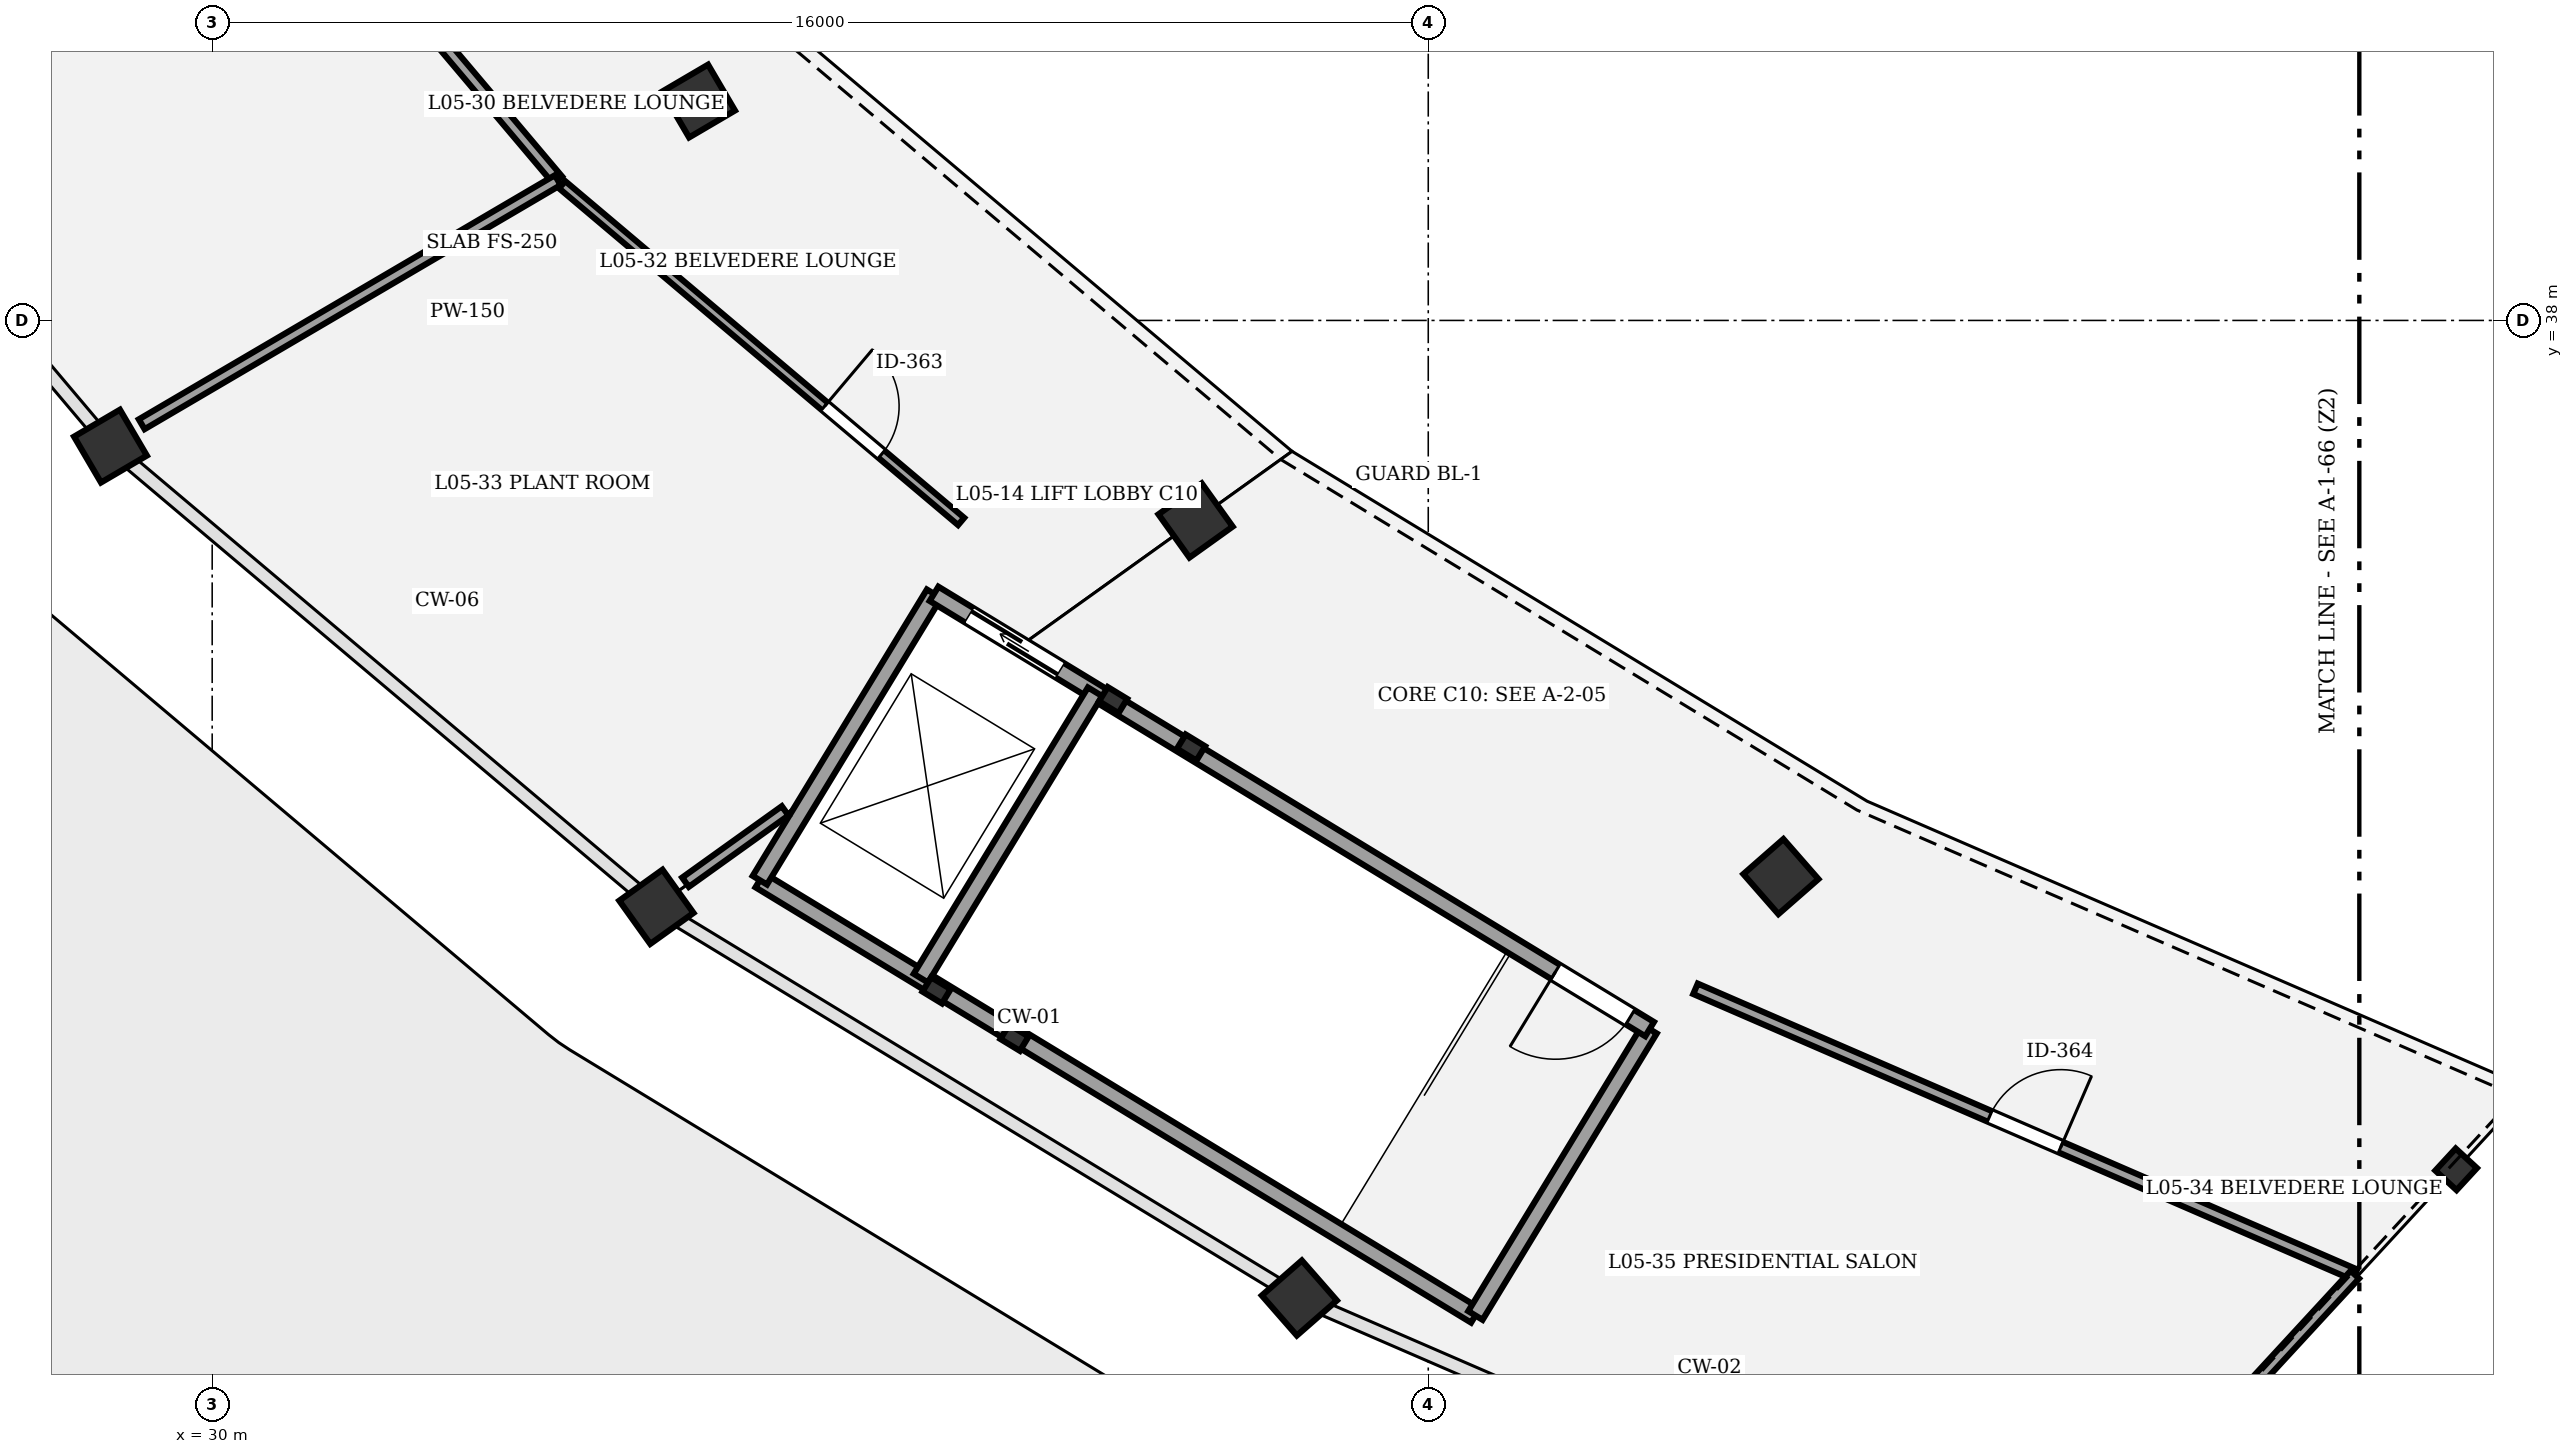
"""IFC4 building model, lengths in metres.
Left out: names, types, materials, properties, quantities, classifications, styles, units other than length and angle.
Written with IfcOpenShell. Run it as: python <this file> out.ifc"""

import sys

from ifc_helpers import new_model, si_unit, direction, frame, frame_2d, origin, origin_2d, place, context, subcontext, project, spatial, rectangle, i_section, extrude, element, fill, save


model = new_model("IFC4")
c1 = context("Model", 3, precision=1e-05, world=origin(), true_north=direction((0.0, 1.0)))
c2 = subcontext(c1, "Body", "Model", "MODEL_VIEW")
j1 = project(units=[si_unit("LENGTHUNIT", "METRE"), si_unit("PLANEANGLEUNIT", "RADIAN")], contexts=[c1])
p1 = place(None, origin())
s1 = spatial("IfcSite", under=j1, at=p1, CompositionType="ELEMENT")
p2 = place(p1, origin())
s2 = spatial("IfcBuilding", under=s1, at=p2, CompositionType="ELEMENT")
p3 = place(p2, frame((0.0, 0.0, 24.0)))
s3 = spatial("IfcBuildingStorey", under=s2, at=p3, CompositionType="ELEMENT", Elevation=24.0)
for number, where, z_axis, x_axis in (
    (1, (36.4, 40.886, 0.0), (0.0, 0.0, 1.0), (-0.863, -0.506, 0.0)),
    (2, (28.662, 36.346, 0.0), (0.0, 0.0, 1.0), (-0.863, -0.506, 0.0)),
    (3, (42.939, 35.368, 0.0), (0.0, 0.0, 1.0), (-0.813, -0.582, 0.0)),
    (4, (35.844, 30.285, 0.0), (0.0, 0.0, 1.0), (-0.813, -0.582, 0.0)),
    (5, (50.64, 30.683, 0.0), (0.0, 0.0, 1.0), (-0.753, -0.659, 0.0)),
    (6, (44.304, 25.139, 0.0), (0.0, 0.0, 1.0), (-0.753, -0.659, 0.0)),
):
    element("IfcColumn", number, at=place(p3, frame(where, z_axis=z_axis, x_axis=x_axis)), inside=s3, PredefinedType="COLUMN", context=c2, shape_type="SweptSolid", body=[
        extrude(rectangle(XDim=0.7, YDim=0.7, at=origin_2d()), origin(), (0.0, 0.0, 1.0), 4.8),
    ])
p4 = place(p3, frame((59.524, 26.832, 0.0), z_axis=(0.0, 0.0, 1.0), x_axis=(-0.677903094969, -0.735151272753, 0.0)))
e7 = element("IfcColumn", 7, at=p4, inside=s3, PredefinedType="COLUMN", context=c2, shape_type="SweptSolid", body=[
    extrude(i_section(OverallWidth=0.395, OverallDepth=0.38, WebThickness=0.017, FlangeThickness=0.026, at=origin_2d()), origin(), (0.0, 0.0, 1.0), 4.8),
])
for number, where, z_axis, x_axis in (
    (8, (42.879, 32.382, 0.0), (0.0, 0.0, 1.0), (-0.854, 0.52, 0.0)),
    (9, (41.854, 33.005, 0.0), (0.0, 0.0, 1.0), (-0.854, 0.52, 0.0)),
    (10, (39.531, 29.186, 0.0), (0.0, 0.0, 1.0), (-0.854, 0.52, 0.0)),
    (11, (40.556, 28.562, 0.0), (0.0, 0.0, 1.0), (-0.854, 0.52, 0.0)),
):
    element("IfcColumn", number, at=place(p3, frame(where, z_axis=z_axis, x_axis=x_axis)), inside=s3, PredefinedType="COLUMN", context=c2, shape_type="SweptSolid", body=[
        extrude(rectangle(XDim=0.3, YDim=0.22, at=origin_2d()), origin(), (0.0, 0.0, 1.0), 4.8),
    ])
p5 = place(p3, frame((46.621, 24.909, 0.0), z_axis=(0.0, 0.0, 1.0), x_axis=(-0.854373055797, 0.519660159651, 0.0)))
e12 = element("IfcWall", 12, at=p5, inside=s3, PredefinedType="SHEAR", context=c2, shape_type="SweptSolid", body=[
    extrude(rectangle(XDim=11.02, YDim=0.22, at=frame_2d((5.51, 0.0))), origin(), (0.0, 0.0, 1.0), 4.55),
])
p6 = place(p3, frame((48.913, 28.677, 0.0), z_axis=(0.0, 0.0, 1.0), x_axis=(-0.519729151243, -0.854331088834, 0.0)))
e13 = element("IfcWall", 13, at=p6, inside=s3, PredefinedType="SHEAR", context=c2, shape_type="SweptSolid", body=[
    extrude(rectangle(XDim=4.41, YDim=0.22, at=frame_2d((2.205, 0.0))), origin(), (0.0, 0.0, 1.0), 4.55),
])
p7 = place(p3, frame((39.497, 34.403, 0.0), z_axis=(0.0, 0.0, 1.0), x_axis=(-0.519664162523, -0.854370621095, 0.0)))
e14 = element("IfcWall", 14, at=p7, inside=s3, PredefinedType="SHEAR", context=c2, shape_type="SweptSolid", body=[
    extrude(rectangle(XDim=4.41, YDim=0.22, at=frame_2d((2.205, 0.0))), origin(), (0.0, 0.0, 1.0), 4.55),
])
p8 = place(p3, frame((48.913, 28.677, 0.0), z_axis=(0.0, 0.0, 1.0), x_axis=(-0.854369202373, 0.51966649501, 0.0)))
e15 = element("IfcWall", 15, at=p8, inside=s3, PredefinedType="SHEAR", context=c2, shape_type="SweptSolid", body=[
    extrude(rectangle(XDim=11.02, YDim=0.22, at=frame_2d((5.51, 0.0))), origin(), (0.0, 0.0, 1.0), 4.55),
])
p9 = place(p8, frame((0.3, 0.0, 0.0)))
e16 = element("IfcOpeningElement", 16, at=p9, cuts=e15, PredefinedType="OPENING", context=c2, shape_type="SweptSolid", body=[
    extrude(rectangle(XDim=1.15, YDim=2.15, at=frame_2d((0.575, 1.075))), frame((0.0, 0.12, 0.0), z_axis=(0.0, -1.0, 0.0), x_axis=(1.0, 0.0, 0.0)), (0.0, 0.0, 1.0), 0.24),
])
p10 = place(p8, frame((9.08, 0.0, 0.0)))
e17 = element("IfcOpeningElement", 17, at=p10, cuts=e15, PredefinedType="OPENING", context=c2, shape_type="SweptSolid", body=[
    extrude(rectangle(XDim=1.4, YDim=2.25, at=frame_2d((0.7, 1.125))), frame((0.0, 0.12, 0.0), z_axis=(0.0, -1.0, 0.0), x_axis=(1.0, 0.0, 0.0)), (0.0, 0.0, 1.0), 0.24),
])
p11 = place(p3, frame((41.616, 33.115, 0.0), z_axis=(0.0, 0.0, 1.0), x_axis=(-0.519664162523, -0.854370621095, 0.0)))
e18 = element("IfcWall", 18, at=p11, inside=s3, PredefinedType="SHEAR", context=c2, shape_type="SweptSolid", body=[
    extrude(rectangle(XDim=4.41, YDim=0.22, at=frame_2d((2.205, 0.0))), origin(), (0.0, 0.0, 1.0), 4.55),
])
p12 = place(p3, frame((29.099, 46.296, 0.0), z_axis=(0.0, 0.0, 1.0), x_axis=(0.645165438128, -0.764042902883, 0.0)))
e19 = element("IfcWall", 19, at=p12, inside=s3, PredefinedType="PARTITIONING", context=c2, shape_type="SweptSolid", body=[
    extrude(rectangle(XDim=8.443, YDim=0.15, at=frame_2d((4.221, 0.0))), origin(), (0.0, 0.0, 1.0), 3.55),
])
p13 = place(p12, frame((3.751, 0.0, 0.0)))
e20 = element("IfcOpeningElement", 20, at=p13, cuts=e19, PredefinedType="OPENING", context=c2, shape_type="SweptSolid", body=[
    extrude(rectangle(XDim=0.94, YDim=2.1, at=frame_2d((0.47, 1.05))), frame((0.0, 0.085, 0.0), z_axis=(0.0, -1.0, 0.0), x_axis=(1.0, 0.0, 0.0)), (0.0, 0.0, 1.0), 0.17),
])
p14 = place(p3, frame((34.604, 39.786, 0.0), z_axis=(0.0, 0.0, 1.0), x_axis=(0.764250978745, -0.644918941796, 0.0)))
e21 = element("IfcWall", 21, at=p14, inside=s3, PredefinedType="PARTITIONING", context=c2, shape_type="SweptSolid", body=[
    extrude(rectangle(XDim=6.87, YDim=0.125, at=frame_2d((3.435, 0.0))), origin(), (0.0, 0.0, 1.0), 3.55),
])
p15 = place(p14, frame((4.52, 0.0, 0.0)))
e22 = element("IfcOpeningElement", 22, at=p15, cuts=e21, PredefinedType="OPENING", context=c2, shape_type="SweptSolid", body=[
    extrude(rectangle(XDim=0.98, YDim=2.1, at=frame_2d((0.49, 1.05))), frame((0.0, 0.073, 0.0), z_axis=(0.0, -1.0, 0.0), x_axis=(1.0, 0.0, 0.0)), (0.0, 0.0, 1.0), 0.145),
])
p16 = place(p3, frame((49.516, 29.207, 0.0), z_axis=(0.0, 0.0, 1.0), x_axis=(0.917503809005, -0.397726992371, 0.0)))
e23 = element("IfcWall", 23, at=p16, inside=s3, PredefinedType="PARTITIONING", context=c2, shape_type="SweptSolid", body=[
    extrude(rectangle(XDim=9.456, YDim=0.15, at=frame_2d((4.728, 0.0))), origin(), (0.0, 0.0, 1.0), 3.55),
])
p17 = place(p16, frame((4.218, 0.0, 0.0)))
e24 = element("IfcOpeningElement", 24, at=p17, cuts=e23, PredefinedType="OPENING", context=c2, shape_type="SweptSolid", body=[
    extrude(rectangle(XDim=1.02, YDim=2.1, at=frame_2d((0.51, 1.05))), frame((0.0, 0.085, 0.0), z_axis=(0.0, -1.0, 0.0), x_axis=(1.0, 0.0, 0.0)), (0.0, 0.0, 1.0), 0.17),
])
p18 = place(p3, frame((34.546, 39.845, 0.0), z_axis=(0.0, 0.0, 1.0), x_axis=(-0.862509234247, -0.506041323251, 0.0)))
e25 = element("IfcWall", 25, at=p18, inside=s3, PredefinedType="PARTITIONING", context=c2, shape_type="SweptSolid", body=[
    extrude(rectangle(XDim=6.346, YDim=0.15, at=frame_2d((3.173, 0.0))), origin(), (0.0, 0.0, 1.0), 3.55),
])
p19 = place(p3, frame((37.538, 31.548, 0.0), z_axis=(0.0, 0.0, 1.0), x_axis=(-0.812873277571, -0.582440584618, 0.0)))
e26 = element("IfcWall", 26, at=p19, inside=s3, PredefinedType="PARTITIONING", context=c2, shape_type="SweptSolid", body=[
    extrude(rectangle(XDim=1.613, YDim=0.15, at=frame_2d((0.806, 0.0))), origin(), (0.0, 0.0, 1.0), 3.55),
])
p20 = place(p3, frame((58.191, 25.446, 0.0), z_axis=(0.0, 0.0, 1.0), x_axis=(-0.677864295951, -0.735187048495, 0.0)))
e27 = element("IfcWall", 27, at=p20, inside=s3, PredefinedType="PARTITIONING", context=c2, shape_type="SweptSolid", body=[
    extrude(rectangle(XDim=5.635, YDim=0.15, at=frame_2d((2.817, 0.0))), origin(), (0.0, 0.0, 1.0), 3.55),
])
p21 = place(p9, origin())
e28 = element("IfcDoor", 28, at=p21, inside=s3, OperationType="SINGLE_SWING_RIGHT", PredefinedType="DOOR", context=c2, shape_type="SweptSolid", body=[
    extrude(rectangle(XDim=1.15, YDim=2.15, at=frame_2d((0.575, 1.075))), frame((0.0, 0.025, 0.0), z_axis=(0.0, -1.0, 0.0), x_axis=(1.0, 0.0, 0.0)), (0.0, 0.0, 1.0), 0.05),
])
fill(e16, e28)
p22 = place(p10, origin())
e29 = element("IfcDoor", 29, at=p22, inside=s3, OperationType="DOUBLE_DOOR_SLIDING", PredefinedType="DOOR", context=c2, shape_type="SweptSolid", body=[
    extrude(rectangle(XDim=1.4, YDim=2.25, at=frame_2d((0.7, 1.125))), frame((0.0, 0.025, 0.0), z_axis=(0.0, -1.0, 0.0), x_axis=(1.0, 0.0, 0.0)), (0.0, 0.0, 1.0), 0.05),
])
fill(e17, e29)
p23 = place(p15, origin())
e30 = element("IfcDoor", 30, at=p23, inside=s3, OperationType="SINGLE_SWING_LEFT", PredefinedType="DOOR", context=c2, shape_type="SweptSolid", body=[
    extrude(rectangle(XDim=0.98, YDim=2.1, at=frame_2d((0.49, 1.05))), frame((0.0, 0.025, 0.0), z_axis=(0.0, -1.0, 0.0), x_axis=(1.0, 0.0, 0.0)), (0.0, 0.0, 1.0), 0.05),
])
fill(e22, e30)
p24 = place(p17, origin())
e31 = element("IfcDoor", 31, at=p24, inside=s3, OperationType="SINGLE_SWING_RIGHT", PredefinedType="DOOR", context=c2, shape_type="SweptSolid", body=[
    extrude(rectangle(XDim=1.02, YDim=2.1, at=frame_2d((0.51, 1.05))), frame((0.0, 0.025, 0.0), z_axis=(0.0, -1.0, 0.0), x_axis=(1.0, 0.0, 0.0)), (0.0, 0.0, 1.0), 0.05),
])
fill(e24, e31)
save(model, sys.argv[1])
